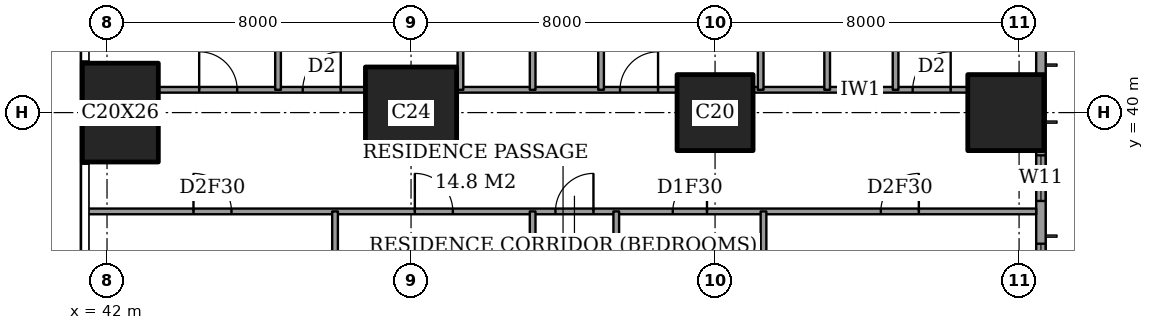
"""IFC4 building model, lengths in metres.
Left out: names, types, materials, properties, quantities, classifications, styles, units other than length and angle.
Written with IfcOpenShell. Run it as: python <this file> out.ifc"""

import sys

from ifc_helpers import new_model, si_unit, direction, frame, frame_2d, origin, origin_2d, place, context, subcontext, project, spatial, rectangle, extrude, element, fill, save


model = new_model("IFC4")
c1 = context("Model", 3, precision=1e-05, world=origin(), true_north=direction((0.0, 1.0)))
c2 = subcontext(c1, "Body", "Model", "MODEL_VIEW")
j1 = project(units=[si_unit("LENGTHUNIT", "METRE"), si_unit("PLANEANGLEUNIT", "RADIAN")], contexts=[c1])
p1 = place(None, origin())
s1 = spatial("IfcSite", under=j1, at=p1, CompositionType="ELEMENT")
p2 = place(p1, origin())
s2 = spatial("IfcBuilding", under=s1, at=p2, CompositionType="ELEMENT")
p3 = place(p2, frame((0.0, 0.0, 164.6)))
s3 = spatial("IfcBuildingStorey", under=s2, at=p3, CompositionType="ELEMENT", Elevation=164.6)
p4 = place(p3, frame((42.35, 40.0, 0.0), z_axis=(0.0, 0.0, 1.0), x_axis=(1.0, 0.0, 0.0)))
e1 = element("IfcColumn", 1, at=p4, inside=s3, PredefinedType="COLUMN", context=c2, shape_type="SweptSolid", body=[
    extrude(rectangle(XDim=2.0, YDim=2.6, at=origin_2d()), origin(), (0.0, 0.0, 1.0), 3.6),
])
p5 = place(p3, frame((50.0, 40.0, 0.0), z_axis=(0.0, 0.0, 1.0), x_axis=(1.0, 0.0, 0.0)))
e2 = element("IfcColumn", 2, at=p5, inside=s3, PredefinedType="COLUMN", context=c2, shape_type="SweptSolid", body=[
    extrude(rectangle(XDim=2.4, YDim=2.4, at=origin_2d()), origin(), (0.0, 0.0, 1.0), 3.6),
])
for number, where, z_axis, x_axis in (
    (3, (58.0, 40.0, 0.0), (0.0, 0.0, 1.0), (1.0, 0.0, 0.0)),
    (4, (65.65, 40.0, 0.0), (0.0, 0.0, 1.0), (1.0, 0.0, 0.0)),
):
    element("IfcColumn", number, at=place(p3, frame(where, z_axis=z_axis, x_axis=x_axis)), inside=s3, PredefinedType="COLUMN", context=c2, shape_type="SweptSolid", body=[
        extrude(rectangle(XDim=2.0, YDim=2.0, at=origin_2d()), origin(), (0.0, 0.0, 1.0), 3.6),
    ])
p6 = place(p3, frame((66.575, 3.175, 0.0), z_axis=(0.0, 0.0, 1.0), x_axis=(0.0, 1.0, 0.0)))
e5 = element("IfcWall", 5, at=p6, inside=s3, PredefinedType="SOLIDWALL", context=c2, shape_type="SweptSolid", body=[
    extrude(rectangle(XDim=41.65, YDim=0.25, at=frame_2d((20.825, 0.0))), origin(), (0.0, 0.0, 1.0), 3.6),
])
p7 = place(p6, frame((0.775, 0.0, 0.4)))
e6 = element("IfcOpeningElement", 6, at=p7, cuts=e5, PredefinedType="OPENING", context=c2, shape_type="SweptSolid", body=[
    extrude(rectangle(XDim=2.4, YDim=2.2, at=frame_2d((1.2, 1.1))), frame((0.0, 0.135, 0.0), z_axis=(0.0, -1.0, 0.0), x_axis=(1.0, 0.0, 0.0)), (0.0, 0.0, 1.0), 0.27),
])
p8 = place(p6, frame((6.225, 0.0, 0.4)))
e7 = element("IfcOpeningElement", 7, at=p8, cuts=e5, PredefinedType="OPENING", context=c2, shape_type="SweptSolid", body=[
    extrude(rectangle(XDim=1.2, YDim=2.2, at=frame_2d((0.6, 1.1))), frame((0.0, 0.135, 0.0), z_axis=(0.0, -1.0, 0.0), x_axis=(1.0, 0.0, 0.0)), (0.0, 0.0, 1.0), 0.27),
])
p9 = place(p6, frame((8.475, 0.0, 0.4)))
e8 = element("IfcOpeningElement", 8, at=p9, cuts=e5, PredefinedType="OPENING", context=c2, shape_type="SweptSolid", body=[
    extrude(rectangle(XDim=2.4, YDim=2.2, at=frame_2d((1.2, 1.1))), frame((0.0, 0.135, 0.0), z_axis=(0.0, -1.0, 0.0), x_axis=(1.0, 0.0, 0.0)), (0.0, 0.0, 1.0), 0.27),
])
p10 = place(p6, frame((15.775, 0.0, 0.4)))
e9 = element("IfcOpeningElement", 9, at=p10, cuts=e5, PredefinedType="OPENING", context=c2, shape_type="SweptSolid", body=[
    extrude(rectangle(XDim=2.4, YDim=2.2, at=frame_2d((1.2, 1.1))), frame((0.0, 0.135, 0.0), z_axis=(0.0, -1.0, 0.0), x_axis=(1.0, 0.0, 0.0)), (0.0, 0.0, 1.0), 0.27),
])
p11 = place(p6, frame((23.475, 0.0, 0.4)))
e10 = element("IfcOpeningElement", 10, at=p11, cuts=e5, PredefinedType="OPENING", context=c2, shape_type="SweptSolid", body=[
    extrude(rectangle(XDim=2.4, YDim=2.2, at=frame_2d((1.2, 1.1))), frame((0.0, 0.135, 0.0), z_axis=(0.0, -1.0, 0.0), x_axis=(1.0, 0.0, 0.0)), (0.0, 0.0, 1.0), 0.27),
])
p12 = place(p6, frame((30.975, 0.0, 0.4)))
e11 = element("IfcOpeningElement", 11, at=p12, cuts=e5, PredefinedType="OPENING", context=c2, shape_type="SweptSolid", body=[
    extrude(rectangle(XDim=2.4, YDim=2.2, at=frame_2d((1.2, 1.1))), frame((0.0, 0.135, 0.0), z_axis=(0.0, -1.0, 0.0), x_axis=(1.0, 0.0, 0.0)), (0.0, 0.0, 1.0), 0.27),
])
p13 = place(p6, frame((34.5, 0.0, 0.4)))
e12 = element("IfcOpeningElement", 12, at=p13, cuts=e5, PredefinedType="OPENING", context=c2, shape_type="SweptSolid", body=[
    extrude(rectangle(XDim=1.2, YDim=2.2, at=frame_2d((0.6, 1.1))), frame((0.0, 0.135, 0.0), z_axis=(0.0, -1.0, 0.0), x_axis=(1.0, 0.0, 0.0)), (0.0, 0.0, 1.0), 0.27),
])
p14 = place(p6, frame((38.475, 0.0, 0.4)))
e13 = element("IfcOpeningElement", 13, at=p14, cuts=e5, PredefinedType="OPENING", context=c2, shape_type="SweptSolid", body=[
    extrude(rectangle(XDim=2.4, YDim=2.2, at=frame_2d((1.2, 1.1))), frame((0.0, 0.135, 0.0), z_axis=(0.0, -1.0, 0.0), x_axis=(1.0, 0.0, 0.0)), (0.0, 0.0, 1.0), 0.27),
])
p15 = place(p3, frame((41.439, 37.4, 0.0), z_axis=(0.0, 0.0, 1.0), x_axis=(1.0, 0.0, 0.0)))
e14 = element("IfcWall", 14, at=p15, inside=s3, PredefinedType="PARTITIONING", context=c2, shape_type="SweptSolid", body=[
    extrude(rectangle(XDim=25.011, YDim=0.15, at=frame_2d((12.505, 0.0))), origin(), (0.0, 0.0, 1.0), 3.35),
])
p16 = place(p15, frame((12.361, 0.0, 0.0)))
e15 = element("IfcOpeningElement", 15, at=p16, cuts=e14, PredefinedType="OPENING", context=c2, shape_type="SweptSolid", body=[
    extrude(rectangle(XDim=1.0, YDim=2.1, at=frame_2d((0.5, 1.05))), frame((0.0, 0.085, 0.0), z_axis=(0.0, -1.0, 0.0), x_axis=(1.0, 0.0, 0.0)), (0.0, 0.0, 1.0), 0.17),
])
p17 = place(p15, frame((20.924, 0.0, 0.0)))
e16 = element("IfcOpeningElement", 16, at=p17, cuts=e14, PredefinedType="OPENING", context=c2, shape_type="SweptSolid", body=[
    extrude(rectangle(XDim=1.0, YDim=2.1, at=frame_2d((0.5, 1.05))), frame((0.0, 0.085, 0.0), z_axis=(0.0, -1.0, 0.0), x_axis=(1.0, 0.0, 0.0)), (0.0, 0.0, 1.0), 0.17),
])
p18 = place(p15, frame((15.448, 0.0, 0.0)))
e17 = element("IfcOpeningElement", 17, at=p18, cuts=e14, PredefinedType="OPENING", context=c2, shape_type="SweptSolid", body=[
    extrude(rectangle(XDim=0.9, YDim=2.1, at=frame_2d((0.45, 1.05))), frame((0.0, 0.085, 0.0), z_axis=(0.0, -1.0, 0.0), x_axis=(1.0, 0.0, 0.0)), (0.0, 0.0, 1.0), 0.17),
])
p19 = place(p15, frame((8.661, 0.0, 0.0)))
e18 = element("IfcOpeningElement", 18, at=p19, cuts=e14, PredefinedType="OPENING", context=c2, shape_type="SweptSolid", body=[
    extrude(rectangle(XDim=1.0, YDim=2.1, at=frame_2d((0.5, 1.05))), frame((0.0, 0.085, 0.0), z_axis=(0.0, -1.0, 0.0), x_axis=(1.0, 0.0, 0.0)), (0.0, 0.0, 1.0), 0.17),
])
p20 = place(p15, frame((2.836, 0.0, 0.0)))
e19 = element("IfcOpeningElement", 19, at=p20, cuts=e14, PredefinedType="OPENING", context=c2, shape_type="SweptSolid", body=[
    extrude(rectangle(XDim=1.0, YDim=2.1, at=frame_2d((0.5, 1.05))), frame((0.0, 0.085, 0.0), z_axis=(0.0, -1.0, 0.0), x_axis=(1.0, 0.0, 0.0)), (0.0, 0.0, 1.0), 0.17),
])
p21 = place(p3, frame((43.35, 40.6, 0.0), z_axis=(0.0, 0.0, 1.0), x_axis=(1.0, 0.0, 0.0)))
e20 = element("IfcWall", 20, at=p21, inside=s3, PredefinedType="PARTITIONING", context=c2, shape_type="SweptSolid", body=[
    extrude(rectangle(XDim=5.45, YDim=0.15, at=frame_2d((2.725, 0.0))), origin(), (0.0, 0.0, 1.0), 3.35),
])
p22 = place(p21, frame((3.8, 0.0, 0.0)))
e21 = element("IfcOpeningElement", 21, at=p22, cuts=e20, PredefinedType="OPENING", context=c2, shape_type="SweptSolid", body=[
    extrude(rectangle(XDim=1.0, YDim=2.1, at=frame_2d((0.5, 1.05))), frame((0.0, 0.085, 0.0), z_axis=(0.0, -1.0, 0.0), x_axis=(1.0, 0.0, 0.0)), (0.0, 0.0, 1.0), 0.17),
])
p23 = place(p21, frame((1.075, 0.0, 0.0)))
e22 = element("IfcOpeningElement", 22, at=p23, cuts=e20, PredefinedType="OPENING", context=c2, shape_type="SweptSolid", body=[
    extrude(rectangle(XDim=1.0, YDim=2.1, at=frame_2d((0.5, 1.05))), frame((0.0, 0.085, 0.0), z_axis=(0.0, -1.0, 0.0), x_axis=(1.0, 0.0, 0.0)), (0.0, 0.0, 1.0), 0.17),
])
p24 = place(p3, frame((51.2, 40.6, 0.0), z_axis=(0.0, 0.0, 1.0), x_axis=(1.0, 0.0, 0.0)))
e23 = element("IfcWall", 23, at=p24, inside=s3, PredefinedType="PARTITIONING", context=c2, shape_type="SweptSolid", body=[
    extrude(rectangle(XDim=5.8, YDim=0.15, at=frame_2d((2.9, 0.0))), origin(), (0.0, 0.0, 1.0), 3.35),
])
p25 = place(p24, frame((4.3, 0.0, 0.0)))
e24 = element("IfcOpeningElement", 24, at=p25, cuts=e23, PredefinedType="OPENING", context=c2, shape_type="SweptSolid", body=[
    extrude(rectangle(XDim=1.0, YDim=2.1, at=frame_2d((0.5, 1.05))), frame((0.0, 0.085, 0.0), z_axis=(0.0, -1.0, 0.0), x_axis=(1.0, 0.0, 0.0)), (0.0, 0.0, 1.0), 0.17),
])
p26 = place(p3, frame((59.0, 40.6, 0.0), z_axis=(0.0, 0.0, 1.0), x_axis=(1.0, 0.0, 0.0)))
e25 = element("IfcWall", 25, at=p26, inside=s3, PredefinedType="PARTITIONING", context=c2, shape_type="SweptSolid", body=[
    extrude(rectangle(XDim=5.65, YDim=0.15, at=frame_2d((2.825, 0.0))), origin(), (0.0, 0.0, 1.0), 3.35),
])
p27 = place(p26, frame((4.2, 0.0, 0.0)))
e26 = element("IfcOpeningElement", 26, at=p27, cuts=e25, PredefinedType="OPENING", context=c2, shape_type="SweptSolid", body=[
    extrude(rectangle(XDim=1.0, YDim=2.1, at=frame_2d((0.5, 1.05))), frame((0.0, 0.085, 0.0), z_axis=(0.0, -1.0, 0.0), x_axis=(1.0, 0.0, 0.0)), (0.0, 0.0, 1.0), 0.17),
])
p28 = place(p3, frame((46.5, 40.6, 0.0), z_axis=(0.0, 0.0, 1.0), x_axis=(0.0, 1.0, 0.0)))
e27 = element("IfcWall", 27, at=p28, inside=s3, PredefinedType="PARTITIONING", context=c2, shape_type="SweptSolid", body=[
    extrude(rectangle(XDim=7.85, YDim=0.15, at=frame_2d((3.925, 0.0))), origin(), (0.0, 0.0, 1.0), 3.35),
])
p29 = place(p3, frame((48.0, 28.0, 0.0), z_axis=(0.0, 0.0, 1.0), x_axis=(0.0, 1.0, 0.0)))
e28 = element("IfcWall", 28, at=p29, inside=s3, PredefinedType="PARTITIONING", context=c2, shape_type="SweptSolid", body=[
    extrude(rectangle(XDim=9.4, YDim=0.15, at=frame_2d((4.7, 0.0))), origin(), (0.0, 0.0, 1.0), 3.35),
])
p30 = place(p29, frame((0.837, 0.0, 0.0)))
e29 = element("IfcOpeningElement", 29, at=p30, cuts=e28, PredefinedType="OPENING", context=c2, shape_type="SweptSolid", body=[
    extrude(rectangle(XDim=1.0, YDim=2.1, at=frame_2d((0.5, 1.05))), frame((0.0, 0.085, 0.0), z_axis=(0.0, -1.0, 0.0), x_axis=(1.0, 0.0, 0.0)), (0.0, 0.0, 1.0), 0.17),
])
p31 = place(p3, frame((51.3, 40.6, 0.0), z_axis=(0.0, 0.0, 1.0), x_axis=(0.0, 1.0, 0.0)))
e30 = element("IfcWall", 30, at=p31, inside=s3, PredefinedType="PARTITIONING", context=c2, shape_type="SweptSolid", body=[
    extrude(rectangle(XDim=7.85, YDim=0.15, at=frame_2d((3.925, 0.0))), origin(), (0.0, 0.0, 1.0), 3.35),
])
p32 = place(p31, frame((3.475, 0.0, 0.0)))
e31 = element("IfcOpeningElement", 31, at=p32, cuts=e30, PredefinedType="OPENING", context=c2, shape_type="SweptSolid", body=[
    extrude(rectangle(XDim=0.9, YDim=2.1, at=frame_2d((0.45, 1.05))), frame((0.0, 0.085, 0.0), z_axis=(0.0, -1.0, 0.0), x_axis=(1.0, 0.0, 0.0)), (0.0, 0.0, 1.0), 0.17),
])
p33 = place(p3, frame((53.2, 30.675, 0.0), z_axis=(0.0, 0.0, 1.0), x_axis=(0.0, 1.0, 0.0)))
e32 = element("IfcWall", 32, at=p33, inside=s3, PredefinedType="PARTITIONING", context=c2, shape_type="SweptSolid", body=[
    extrude(rectangle(XDim=6.725, YDim=0.15, at=frame_2d((3.362, 0.0))), origin(), (0.0, 0.0, 1.0), 3.35),
])
p34 = place(p3, frame((53.2, 40.6, 0.0), z_axis=(0.0, 0.0, 1.0), x_axis=(0.0, 1.0, 0.0)))
e33 = element("IfcWall", 33, at=p34, inside=s3, PredefinedType="PARTITIONING", context=c2, shape_type="SweptSolid", body=[
    extrude(rectangle(XDim=7.85, YDim=0.15, at=frame_2d((3.925, 0.0))), origin(), (0.0, 0.0, 1.0), 3.35),
])
p35 = place(p3, frame((55.0, 40.6, 0.0), z_axis=(0.0, 0.0, 1.0), x_axis=(0.0, 1.0, 0.0)))
e34 = element("IfcWall", 34, at=p35, inside=s3, PredefinedType="PARTITIONING", context=c2, shape_type="SweptSolid", body=[
    extrude(rectangle(XDim=7.85, YDim=0.15, at=frame_2d((3.925, 0.0))), origin(), (0.0, 0.0, 1.0), 3.35),
])
p36 = place(p35, frame((3.475, 0.0, 0.0)))
e35 = element("IfcOpeningElement", 35, at=p36, cuts=e34, PredefinedType="OPENING", context=c2, shape_type="SweptSolid", body=[
    extrude(rectangle(XDim=0.9, YDim=2.1, at=frame_2d((0.45, 1.05))), frame((0.0, 0.085, 0.0), z_axis=(0.0, -1.0, 0.0), x_axis=(1.0, 0.0, 0.0)), (0.0, 0.0, 1.0), 0.17),
])
p37 = place(p3, frame((55.4, 28.0, 0.0), z_axis=(0.0, 0.0, 1.0), x_axis=(0.0, 1.0, 0.0)))
e36 = element("IfcWall", 36, at=p37, inside=s3, PredefinedType="PARTITIONING", context=c2, shape_type="SweptSolid", body=[
    extrude(rectangle(XDim=9.4, YDim=0.15, at=frame_2d((4.7, 0.0))), origin(), (0.0, 0.0, 1.0), 3.35),
])
p38 = place(p37, frame((0.837, 0.0, 0.0)))
e37 = element("IfcOpeningElement", 37, at=p38, cuts=e36, PredefinedType="OPENING", context=c2, shape_type="SweptSolid", body=[
    extrude(rectangle(XDim=1.0, YDim=2.1, at=frame_2d((0.5, 1.05))), frame((0.0, 0.085, 0.0), z_axis=(0.0, -1.0, 0.0), x_axis=(1.0, 0.0, 0.0)), (0.0, 0.0, 1.0), 0.17),
])
p39 = place(p3, frame((59.2, 40.6, 0.0), z_axis=(0.0, 0.0, 1.0), x_axis=(0.0, 1.0, 0.0)))
e38 = element("IfcWall", 38, at=p39, inside=s3, PredefinedType="PARTITIONING", context=c2, shape_type="SweptSolid", body=[
    extrude(rectangle(XDim=7.85, YDim=0.15, at=frame_2d((3.925, 0.0))), origin(), (0.0, 0.0, 1.0), 3.35),
])
p40 = place(p3, frame((59.275, 33.2, 0.0), z_axis=(0.0, 0.0, 1.0), x_axis=(0.0, 1.0, 0.0)))
e39 = element("IfcWall", 39, at=p40, inside=s3, PredefinedType="PARTITIONING", context=c2, shape_type="SweptSolid", body=[
    extrude(rectangle(XDim=4.2, YDim=0.15, at=frame_2d((2.1, 0.0))), origin(), (0.0, 0.0, 1.0), 3.35),
])
p41 = place(p3, frame((60.95, 40.6, 0.0), z_axis=(0.0, 0.0, 1.0), x_axis=(0.0, 1.0, 0.0)))
e40 = element("IfcWall", 40, at=p41, inside=s3, PredefinedType="PARTITIONING", context=c2, shape_type="SweptSolid", body=[
    extrude(rectangle(XDim=7.85, YDim=0.15, at=frame_2d((3.925, 0.0))), origin(), (0.0, 0.0, 1.0), 3.35),
])
p42 = place(p41, frame((5.225, 0.0, 0.0)))
e41 = element("IfcOpeningElement", 41, at=p42, cuts=e40, PredefinedType="OPENING", context=c2, shape_type="SweptSolid", body=[
    extrude(rectangle(XDim=0.9, YDim=2.1, at=frame_2d((0.45, 1.05))), frame((0.0, 0.085, 0.0), z_axis=(0.0, -1.0, 0.0), x_axis=(1.0, 0.0, 0.0)), (0.0, 0.0, 1.0), 0.17),
])
p43 = place(p3, frame((62.75, 40.6, 0.0), z_axis=(0.0, 0.0, 1.0), x_axis=(0.0, 1.0, 0.0)))
e42 = element("IfcWall", 42, at=p43, inside=s3, PredefinedType="PARTITIONING", context=c2, shape_type="SweptSolid", body=[
    extrude(rectangle(XDim=3.5, YDim=0.15, at=frame_2d((1.75, 0.0))), origin(), (0.0, 0.0, 1.0), 3.35),
])
p44 = place(p43, frame((1.3, 0.0, 0.0)))
e43 = element("IfcOpeningElement", 43, at=p44, cuts=e42, PredefinedType="OPENING", context=c2, shape_type="SweptSolid", body=[
    extrude(rectangle(XDim=0.9, YDim=2.1, at=frame_2d((0.45, 1.05))), frame((0.0, 0.085, 0.0), z_axis=(0.0, -1.0, 0.0), x_axis=(1.0, 0.0, 0.0)), (0.0, 0.0, 1.0), 0.17),
])
p45 = place(p12, origin())
e44 = element("IfcWindow", 44, at=p45, inside=s3, PartitioningType="SINGLE_PANEL", PredefinedType="WINDOW", context=c2, shape_type="SweptSolid", body=[
    extrude(rectangle(XDim=2.4, YDim=2.2, at=frame_2d((1.2, 1.1))), frame((0.0, 0.03, 0.0), z_axis=(0.0, -1.0, 0.0), x_axis=(1.0, 0.0, 0.0)), (0.0, 0.0, 1.0), 0.06),
])
fill(e11, e44)
p46 = place(p13, origin())
e45 = element("IfcWindow", 45, at=p46, inside=s3, PartitioningType="SINGLE_PANEL", PredefinedType="WINDOW", context=c2, shape_type="SweptSolid", body=[
    extrude(rectangle(XDim=1.2, YDim=2.2, at=frame_2d((0.6, 1.1))), frame((0.0, 0.03, 0.0), z_axis=(0.0, -1.0, 0.0), x_axis=(1.0, 0.0, 0.0)), (0.0, 0.0, 1.0), 0.06),
])
fill(e12, e45)
p47 = place(p27, origin())
e46 = element("IfcDoor", 46, at=p47, inside=s3, OperationType="SINGLE_SWING_LEFT", PredefinedType="DOOR", context=c2, shape_type="SweptSolid", body=[
    extrude(rectangle(XDim=1.0, YDim=2.1, at=frame_2d((0.5, 1.05))), frame((0.0, 0.025, 0.0), z_axis=(0.0, -1.0, 0.0), x_axis=(1.0, 0.0, 0.0)), (0.0, 0.0, 1.0), 0.05),
])
fill(e26, e46)
p48 = place(p25, origin())
e47 = element("IfcDoor", 47, at=p48, inside=s3, OperationType="SINGLE_SWING_LEFT", PredefinedType="DOOR", context=c2, shape_type="SweptSolid", body=[
    extrude(rectangle(XDim=1.0, YDim=2.1, at=frame_2d((0.5, 1.05))), frame((0.0, 0.025, 0.0), z_axis=(0.0, -1.0, 0.0), x_axis=(1.0, 0.0, 0.0)), (0.0, 0.0, 1.0), 0.05),
])
fill(e24, e47)
p49 = place(p22, origin())
e48 = element("IfcDoor", 48, at=p49, inside=s3, OperationType="SINGLE_SWING_LEFT", PredefinedType="DOOR", context=c2, shape_type="SweptSolid", body=[
    extrude(rectangle(XDim=1.0, YDim=2.1, at=frame_2d((0.5, 1.05))), frame((0.0, 0.025, 0.0), z_axis=(0.0, -1.0, 0.0), x_axis=(1.0, 0.0, 0.0)), (0.0, 0.0, 1.0), 0.05),
])
fill(e21, e48)
p50 = place(p23, origin())
e49 = element("IfcDoor", 49, at=p50, inside=s3, OperationType="SINGLE_SWING_RIGHT", PredefinedType="DOOR", context=c2, shape_type="SweptSolid", body=[
    extrude(rectangle(XDim=1.0, YDim=2.1, at=frame_2d((0.5, 1.05))), frame((0.0, 0.025, 0.0), z_axis=(0.0, -1.0, 0.0), x_axis=(1.0, 0.0, 0.0)), (0.0, 0.0, 1.0), 0.05),
])
fill(e22, e49)
p51 = place(p16, origin())
e50 = element("IfcDoor", 50, at=p51, inside=s3, OperationType="SINGLE_SWING_LEFT", PredefinedType="DOOR", context=c2, shape_type="SweptSolid", body=[
    extrude(rectangle(XDim=1.0, YDim=2.1, at=frame_2d((0.5, 1.05))), frame((0.0, 0.025, 0.0), z_axis=(0.0, -1.0, 0.0), x_axis=(1.0, 0.0, 0.0)), (0.0, 0.0, 1.0), 0.05),
])
fill(e15, e50)
p52 = place(p17, origin())
e51 = element("IfcDoor", 51, at=p52, inside=s3, OperationType="SINGLE_SWING_LEFT", PredefinedType="DOOR", context=c2, shape_type="SweptSolid", body=[
    extrude(rectangle(XDim=1.0, YDim=2.1, at=frame_2d((0.5, 1.05))), frame((0.0, 0.025, 0.0), z_axis=(0.0, -1.0, 0.0), x_axis=(1.0, 0.0, 0.0)), (0.0, 0.0, 1.0), 0.05),
])
fill(e16, e51)
p53 = place(p18, origin())
e52 = element("IfcDoor", 52, at=p53, inside=s3, OperationType="SINGLE_SWING_LEFT", PredefinedType="DOOR", context=c2, shape_type="SweptSolid", body=[
    extrude(rectangle(XDim=0.9, YDim=2.1, at=frame_2d((0.45, 1.05))), frame((0.0, 0.025, 0.0), z_axis=(0.0, -1.0, 0.0), x_axis=(1.0, 0.0, 0.0)), (0.0, 0.0, 1.0), 0.05),
])
fill(e17, e52)
p54 = place(p19, origin())
e53 = element("IfcDoor", 53, at=p54, inside=s3, OperationType="SINGLE_SWING_RIGHT", PredefinedType="DOOR", context=c2, shape_type="SweptSolid", body=[
    extrude(rectangle(XDim=1.0, YDim=2.1, at=frame_2d((0.5, 1.05))), frame((0.0, 0.025, 0.0), z_axis=(0.0, -1.0, 0.0), x_axis=(1.0, 0.0, 0.0)), (0.0, 0.0, 1.0), 0.05),
])
fill(e18, e53)
p55 = place(p20, origin())
e54 = element("IfcDoor", 54, at=p55, inside=s3, OperationType="SINGLE_SWING_RIGHT", PredefinedType="DOOR", context=c2, shape_type="SweptSolid", body=[
    extrude(rectangle(XDim=1.0, YDim=2.1, at=frame_2d((0.5, 1.05))), frame((0.0, 0.025, 0.0), z_axis=(0.0, -1.0, 0.0), x_axis=(1.0, 0.0, 0.0)), (0.0, 0.0, 1.0), 0.05),
])
fill(e19, e54)
save(model, sys.argv[1])
